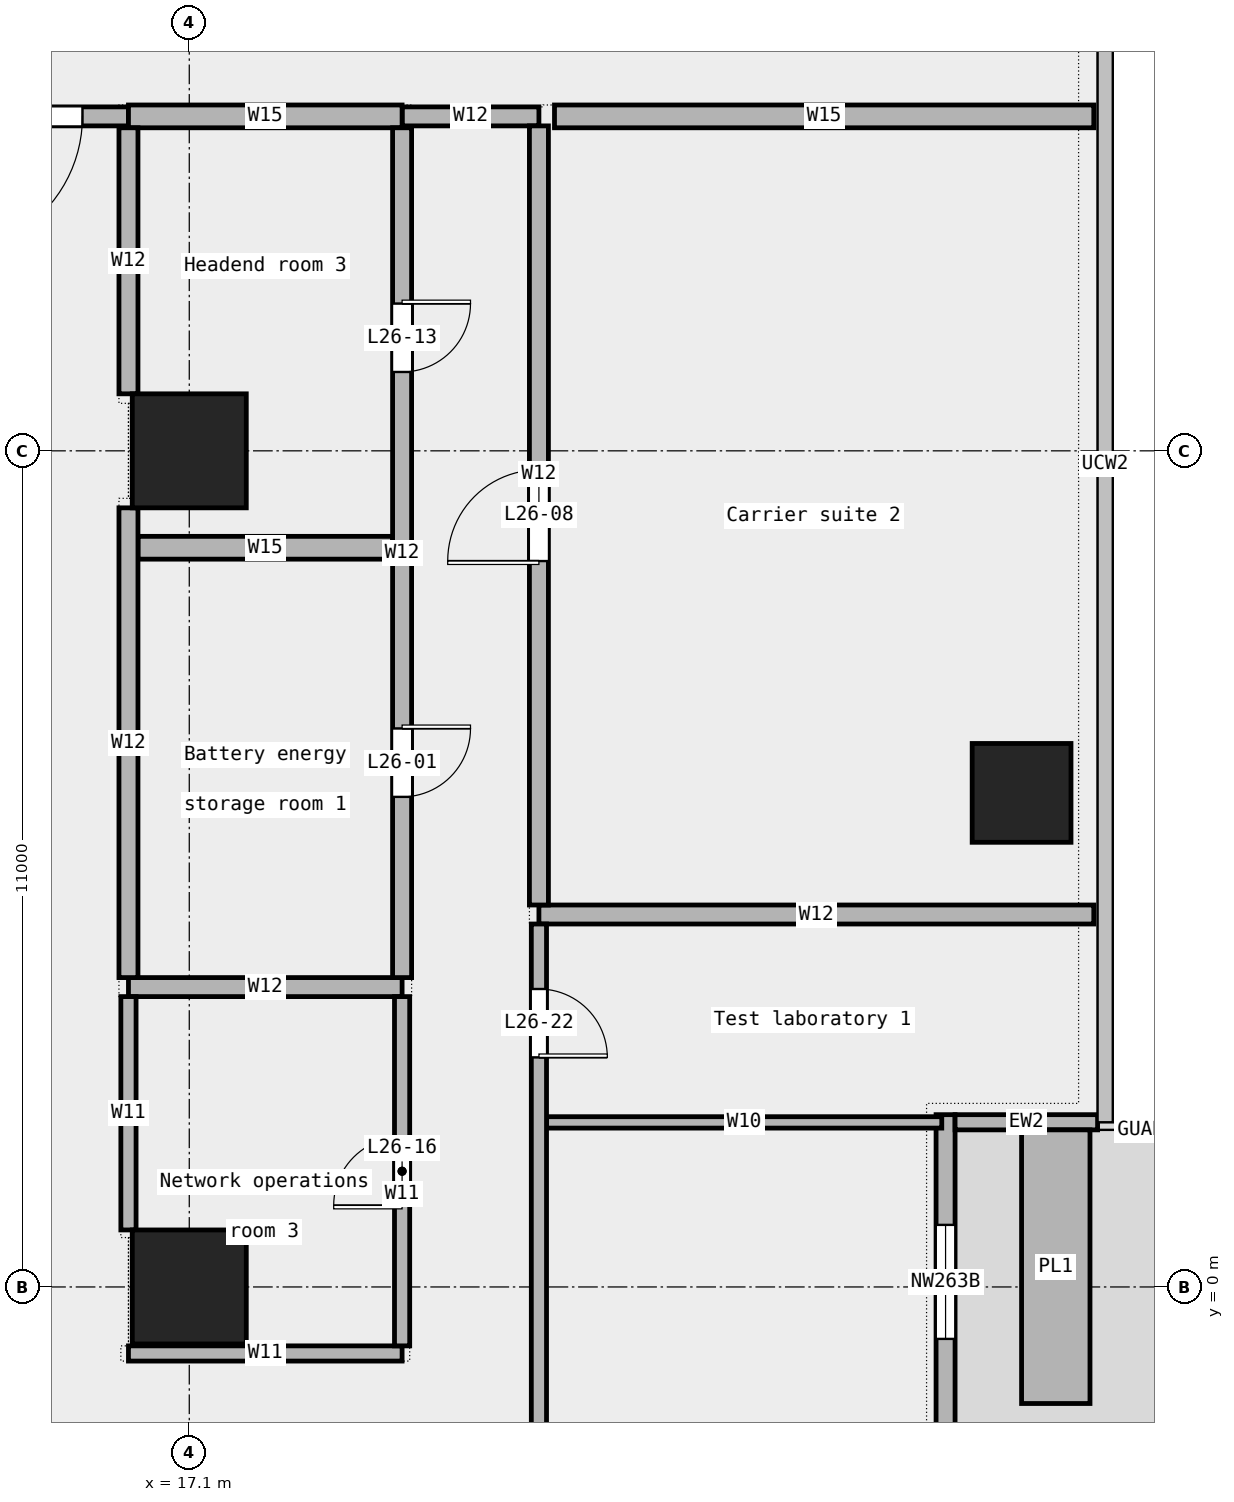
"""IFC4 building model, lengths in metres.
Left out: names, types, materials, properties, quantities, classifications, styles, units other than length and angle.
Written with IfcOpenShell. Run it as: python <this file> out.ifc"""

import sys

from ifc_helpers import new_model, si_unit, direction, frame, frame_2d, origin, origin_2d, place, context, subcontext, project, spatial, rectangle, extrude, element, fill, save


model = new_model("IFC4")
c1 = context("Model", 3, precision=1e-05, world=origin(), true_north=direction((0.0, 1.0)))
c2 = subcontext(c1, "Body", "Model", "MODEL_VIEW")
j1 = project(units=[si_unit("LENGTHUNIT", "METRE"), si_unit("PLANEANGLEUNIT", "RADIAN")], contexts=[c1])
p1 = place(None, origin())
s1 = spatial("IfcSite", under=j1, at=p1, CompositionType="ELEMENT")
p2 = place(p1, origin())
s2 = spatial("IfcBuilding", under=s1, at=p2, CompositionType="ELEMENT")
p3 = place(p2, frame((0.0, 0.0, 130.6)))
s3 = spatial("IfcBuildingStorey", under=s2, at=p3, CompositionType="ELEMENT", Elevation=130.6)
p4 = place(p3, frame((28.05, 6.5, 0.0), z_axis=(0.0, 0.0, 1.0), x_axis=(1.0, 0.0, 0.0)))
e1 = element("IfcColumn", 1, at=p4, inside=s3, PredefinedType="COLUMN", context=c2, shape_type="SweptSolid", body=[
    extrude(rectangle(XDim=1.3, YDim=1.3, at=origin_2d()), origin(), (0.0, 0.0, 1.0), 4.05),
])
for number, where, z_axis, x_axis in (
    (2, (17.1, 0.0, 0.0), (0.0, 0.0, 1.0), (1.0, 0.0, 0.0)),
    (3, (17.1, 11.0, 0.0), (0.0, 0.0, 1.0), (1.0, 0.0, 0.0)),
):
    element("IfcColumn", number, at=place(p3, frame(where, z_axis=z_axis, x_axis=x_axis)), inside=s3, PredefinedType="COLUMN", context=c2, shape_type="SweptSolid", body=[
        extrude(rectangle(XDim=1.5, YDim=1.5, at=origin_2d()), origin(), (0.0, 0.0, 1.0), 4.05),
    ])
p5 = place(p3, frame((27.05, -10.933, 0.0), z_axis=(0.0, 0.0, 1.0), x_axis=(0.0, 1.0, 0.0)))
e4 = element("IfcWall", 4, at=p5, inside=s3, PredefinedType="STANDARD", context=c2, shape_type="SweptSolid", body=[
    extrude(rectangle(XDim=13.2, YDim=0.25, at=frame_2d((6.6, 0.0))), origin(), (0.0, 0.0, 1.0), 4.05),
])
p6 = place(p5, frame((1.5, 0.0, 0.45)))
e5 = element("IfcOpeningElement", 5, at=p6, cuts=e4, PredefinedType="OPENING", context=c2, shape_type="SweptSolid", body=[
    extrude(rectangle(XDim=1.5, YDim=3.0, at=frame_2d((0.75, 1.5))), frame((0.0, 0.137, 0.0), z_axis=(0.0, -1.0, 0.0), x_axis=(1.0, 0.0, 0.0)), (0.0, 0.0, 1.0), 0.274),
])
p7 = place(p5, frame((5.75, 0.0, 0.0)))
e6 = element("IfcOpeningElement", 6, at=p7, cuts=e4, PredefinedType="OPENING", context=c2, shape_type="SweptSolid", body=[
    extrude(rectangle(XDim=1.8, YDim=2.4, at=frame_2d((0.9, 1.2))), frame((0.0, 0.137, 0.0), z_axis=(0.0, -1.0, 0.0), x_axis=(1.0, 0.0, 0.0)), (0.0, 0.0, 1.0), 0.274),
])
p8 = place(p5, frame((10.25, 0.0, 0.45)))
e7 = element("IfcOpeningElement", 7, at=p8, cuts=e4, PredefinedType="OPENING", context=c2, shape_type="SweptSolid", body=[
    extrude(rectangle(XDim=1.5, YDim=3.0, at=frame_2d((0.75, 1.5))), frame((0.0, 0.137, 0.0), z_axis=(0.0, -1.0, 0.0), x_axis=(1.0, 0.0, 0.0)), (0.0, 0.0, 1.0), 0.274),
])
p9 = place(p3, frame((29.05, 2.167, 0.0), z_axis=(0.0, 0.0, 1.0), x_axis=(-1.0, 0.0, 0.0)))
e8 = element("IfcWall", 8, at=p9, inside=s3, PredefinedType="STANDARD", context=c2, shape_type="SweptSolid", body=[
    extrude(rectangle(XDim=1.875, YDim=0.2, at=frame_2d((0.938, 0.0))), origin(), (0.0, 0.0, 1.0), 4.05),
])
p10 = place(p3, frame((28.5, -1.533, 0.0), z_axis=(0.0, 0.0, 1.0), x_axis=(0.0, 1.0, 0.0)))
e9 = element("IfcWall", 9, at=p10, inside=s3, PredefinedType="STANDARD", context=c2, shape_type="SweptSolid", body=[
    extrude(rectangle(XDim=3.6, YDim=0.9, at=frame_2d((1.8, 0.0))), origin(), (0.0, 0.0, 1.0), 0.7),
])
p11 = place(p3, frame((16.3, -0.875, 0.0), z_axis=(0.0, 0.0, 1.0), x_axis=(1.0, 0.0, 0.0)))
e10 = element("IfcWall", 10, at=p11, inside=s3, PredefinedType="PARTITIONING", context=c2, shape_type="SweptSolid", body=[
    extrude(rectangle(XDim=3.6, YDim=0.2, at=frame_2d((1.8, 0.0))), origin(), (0.0, 0.0, 1.0), 4.05),
])
p12 = place(p3, frame((21.8, 2.165, 0.0), z_axis=(0.0, 0.0, 1.0), x_axis=(1.0, 0.0, 0.0)))
e11 = element("IfcWall", 11, at=p12, inside=s3, PredefinedType="PARTITIONING", context=c2, shape_type="SweptSolid", body=[
    extrude(rectangle(XDim=5.2, YDim=0.15, at=frame_2d((2.6, 0.0))), origin(), (0.0, 0.0, 1.0), 4.05),
])
p13 = place(p3, frame((16.3, 3.945, 0.0), z_axis=(0.0, 0.0, 1.0), x_axis=(1.0, 0.0, 0.0)))
e12 = element("IfcWall", 12, at=p13, inside=s3, PredefinedType="PARTITIONING", context=c2, shape_type="SweptSolid", body=[
    extrude(rectangle(XDim=3.6, YDim=0.25, at=frame_2d((1.8, 0.0))), origin(), (0.0, 0.0, 1.0), 4.05),
])
p14 = place(p3, frame((21.7, 4.9, 0.0), z_axis=(0.0, 0.0, 1.0), x_axis=(1.0, 0.0, 0.0)))
e13 = element("IfcWall", 13, at=p14, inside=s3, PredefinedType="PARTITIONING", context=c2, shape_type="SweptSolid", body=[
    extrude(rectangle(XDim=7.3, YDim=0.25, at=frame_2d((3.65, 0.0))), origin(), (0.0, 0.0, 1.0), 4.05),
])
p15 = place(p3, frame((16.425, 9.725, 0.0), z_axis=(0.0, 0.0, 1.0), x_axis=(1.0, 0.0, 0.0)))
e14 = element("IfcWall", 14, at=p15, inside=s3, PredefinedType="PARTITIONING", context=c2, shape_type="SweptSolid", body=[
    extrude(rectangle(XDim=3.35, YDim=0.3, at=frame_2d((1.675, 0.0))), origin(), (0.0, 0.0, 1.0), 4.05),
])
p16 = place(p3, frame((13.29, 15.4, 0.0), z_axis=(0.0, 0.0, 1.0), x_axis=(1.0, 0.0, 0.0)))
e15 = element("IfcWall", 15, at=p16, inside=s3, PredefinedType="PARTITIONING", context=c2, shape_type="SweptSolid", body=[
    extrude(rectangle(XDim=3.01, YDim=0.25, at=frame_2d((1.505, 0.0))), origin(), (0.0, 0.0, 1.0), 4.05),
])
p17 = place(p16, frame((0.605, 0.0, 0.0)))
e16 = element("IfcOpeningElement", 16, at=p17, cuts=e15, PredefinedType="OPENING", context=c2, shape_type="SweptSolid", body=[
    extrude(rectangle(XDim=1.8, YDim=2.1, at=frame_2d((0.9, 1.05))), frame((0.0, 0.137, 0.0), z_axis=(0.0, -1.0, 0.0), x_axis=(1.0, 0.0, 0.0)), (0.0, 0.0, 1.0), 0.274),
])
p18 = place(p3, frame((19.9, 15.4, 0.0), z_axis=(0.0, 0.0, 1.0), x_axis=(1.0, 0.0, 0.0)))
e17 = element("IfcWall", 17, at=p18, inside=s3, PredefinedType="PARTITIONING", context=c2, shape_type="SweptSolid", body=[
    extrude(rectangle(XDim=1.8, YDim=0.25, at=frame_2d((0.9, 0.0))), origin(), (0.0, 0.0, 1.0), 4.05),
])
p19 = place(p3, frame((16.3, 15.4, 0.0), z_axis=(0.0, 0.0, 1.0), x_axis=(1.0, 0.0, 0.0)))
e18 = element("IfcWall", 18, at=p19, inside=s3, PredefinedType="PARTITIONING", context=c2, shape_type="SweptSolid", body=[
    extrude(rectangle(XDim=3.6, YDim=0.3, at=frame_2d((1.8, 0.0))), origin(), (0.0, 0.0, 1.0), 4.05),
])
p20 = place(p3, frame((21.905, 15.4, 0.0), z_axis=(0.0, 0.0, 1.0), x_axis=(1.0, 0.0, 0.0)))
e19 = element("IfcWall", 19, at=p20, inside=s3, PredefinedType="PARTITIONING", context=c2, shape_type="SweptSolid", body=[
    extrude(rectangle(XDim=7.095, YDim=0.3, at=frame_2d((3.547, 0.0))), origin(), (0.0, 0.0, 1.0), 4.05),
])
p21 = place(p3, frame((16.3, 0.75, 0.0), z_axis=(0.0, 0.0, 1.0), x_axis=(0.0, 1.0, 0.0)))
e20 = element("IfcWall", 20, at=p21, inside=s3, PredefinedType="PARTITIONING", context=c2, shape_type="SweptSolid", body=[
    extrude(rectangle(XDim=3.07, YDim=0.2, at=frame_2d((1.535, 0.0))), origin(), (0.0, 0.0, 1.0), 4.05),
])
p22 = place(p3, frame((16.3, 4.07, 0.0), z_axis=(0.0, 0.0, 1.0), x_axis=(0.0, 1.0, 0.0)))
e21 = element("IfcWall", 21, at=p22, inside=s3, PredefinedType="PARTITIONING", context=c2, shape_type="SweptSolid", body=[
    extrude(rectangle(XDim=6.18, YDim=0.25, at=frame_2d((3.09, 0.0))), origin(), (0.0, 0.0, 1.0), 4.05),
])
p23 = place(p3, frame((16.3, 11.75, 0.0), z_axis=(0.0, 0.0, 1.0), x_axis=(0.0, 1.0, 0.0)))
e22 = element("IfcWall", 22, at=p23, inside=s3, PredefinedType="PARTITIONING", context=c2, shape_type="SweptSolid", body=[
    extrude(rectangle(XDim=3.5, YDim=0.25, at=frame_2d((1.75, 0.0))), origin(), (0.0, 0.0, 1.0), 4.05),
])
p24 = place(p3, frame((19.9, -0.775, 0.0), z_axis=(0.0, 0.0, 1.0), x_axis=(0.0, 1.0, 0.0)))
e23 = element("IfcWall", 23, at=p24, inside=s3, PredefinedType="PARTITIONING", context=c2, shape_type="SweptSolid", body=[
    extrude(rectangle(XDim=4.595, YDim=0.2, at=frame_2d((2.297, 0.0))), origin(), (0.0, 0.0, 1.0), 4.05),
])
p25 = place(p24, frame((1.847, 0.0, 0.0)))
e24 = element("IfcOpeningElement", 24, at=p25, cuts=e23, PredefinedType="OPENING", context=c2, shape_type="SweptSolid", body=[
    extrude(rectangle(XDim=0.9, YDim=2.1, at=frame_2d((0.45, 1.05))), frame((0.0, 0.112, 0.0), z_axis=(0.0, -1.0, 0.0), x_axis=(1.0, 0.0, 0.0)), (0.0, 0.0, 1.0), 0.224),
])
p26 = place(p3, frame((19.9, 4.07, 0.0), z_axis=(0.0, 0.0, 1.0), x_axis=(0.0, 1.0, 0.0)))
e25 = element("IfcWall", 25, at=p26, inside=s3, PredefinedType="PARTITIONING", context=c2, shape_type="SweptSolid", body=[
    extrude(rectangle(XDim=11.18, YDim=0.25, at=frame_2d((5.59, 0.0))), origin(), (0.0, 0.0, 1.0), 4.05),
])
p27 = place(p26, frame((2.377, 0.0, 0.0)))
e26 = element("IfcOpeningElement", 26, at=p27, cuts=e25, PredefinedType="OPENING", context=c2, shape_type="SweptSolid", body=[
    extrude(rectangle(XDim=0.9, YDim=2.1, at=frame_2d((0.45, 1.05))), frame((0.0, 0.137, 0.0), z_axis=(0.0, -1.0, 0.0), x_axis=(1.0, 0.0, 0.0)), (0.0, 0.0, 1.0), 0.274),
])
p28 = place(p26, frame((7.968, 0.0, 0.0)))
e27 = element("IfcOpeningElement", 27, at=p28, cuts=e25, PredefinedType="OPENING", context=c2, shape_type="SweptSolid", body=[
    extrude(rectangle(XDim=0.9, YDim=2.1, at=frame_2d((0.45, 1.05))), frame((0.0, 0.137, 0.0), z_axis=(0.0, -1.0, 0.0), x_axis=(1.0, 0.0, 0.0)), (0.0, 0.0, 1.0), 0.274),
])
p29 = place(p3, frame((21.7, -9.0, 0.0), z_axis=(0.0, 0.0, 1.0), x_axis=(0.0, 1.0, 0.0)))
e28 = element("IfcWall", 28, at=p29, inside=s3, PredefinedType="PARTITIONING", context=c2, shape_type="SweptSolid", body=[
    extrude(rectangle(XDim=13.775, YDim=0.2, at=frame_2d((6.887, 0.0))), origin(), (0.0, 0.0, 1.0), 4.05),
])
p30 = place(p29, frame((4.833, 0.0, 0.0)))
e29 = element("IfcOpeningElement", 29, at=p30, cuts=e28, PredefinedType="OPENING", context=c2, shape_type="SweptSolid", body=[
    extrude(rectangle(XDim=1.5, YDim=2.1, at=frame_2d((0.75, 1.05))), frame((0.0, 0.112, 0.0), z_axis=(0.0, -1.0, 0.0), x_axis=(1.0, 0.0, 0.0)), (0.0, 0.0, 1.0), 0.224),
])
p31 = place(p29, frame((12.02, 0.0, 0.0)))
e30 = element("IfcOpeningElement", 30, at=p31, cuts=e28, PredefinedType="OPENING", context=c2, shape_type="SweptSolid", body=[
    extrude(rectangle(XDim=0.9, YDim=2.1, at=frame_2d((0.45, 1.05))), frame((0.0, 0.112, 0.0), z_axis=(0.0, -1.0, 0.0), x_axis=(1.0, 0.0, 0.0)), (0.0, 0.0, 1.0), 0.224),
])
p32 = place(p3, frame((21.7, 5.025, 0.0), z_axis=(0.0, 0.0, 1.0), x_axis=(0.0, 1.0, 0.0)))
e31 = element("IfcWall", 31, at=p32, inside=s3, PredefinedType="PARTITIONING", context=c2, shape_type="SweptSolid", body=[
    extrude(rectangle(XDim=10.25, YDim=0.25, at=frame_2d((5.125, 0.0))), origin(), (0.0, 0.0, 1.0), 4.05),
])
p33 = place(p32, frame((4.525, 0.0, 0.0)))
e32 = element("IfcOpeningElement", 32, at=p33, cuts=e31, PredefinedType="OPENING", context=c2, shape_type="SweptSolid", body=[
    extrude(rectangle(XDim=1.2, YDim=2.1, at=frame_2d((0.6, 1.05))), frame((0.0, 0.137, 0.0), z_axis=(0.0, -1.0, 0.0), x_axis=(1.0, 0.0, 0.0)), (0.0, 0.0, 1.0), 0.274),
])
p34 = place(p8, origin())
e33 = element("IfcWindow", 33, at=p34, inside=s3, PartitioningType="SINGLE_PANEL", PredefinedType="WINDOW", context=c2, shape_type="SweptSolid", body=[
    extrude(rectangle(XDim=1.5, YDim=3.0, at=frame_2d((0.75, 1.5))), frame((0.0, 0.03, 0.0), z_axis=(0.0, -1.0, 0.0), x_axis=(1.0, 0.0, 0.0)), (0.0, 0.0, 1.0), 0.06),
])
fill(e7, e33)
p35 = place(p27, origin())
e34 = element("IfcDoor", 34, at=p35, inside=s3, OperationType="SINGLE_SWING_LEFT", PredefinedType="DOOR", context=c2, shape_type="SweptSolid", body=[
    extrude(rectangle(XDim=0.9, YDim=2.1, at=frame_2d((0.45, 1.05))), frame((0.0, 0.025, 0.0), z_axis=(0.0, -1.0, 0.0), x_axis=(1.0, 0.0, 0.0)), (0.0, 0.0, 1.0), 0.05),
])
fill(e26, e34)
p36 = place(p33, origin())
e35 = element("IfcDoor", 35, at=p36, inside=s3, OperationType="SINGLE_SWING_LEFT", PredefinedType="DOOR", context=c2, shape_type="SweptSolid", body=[
    extrude(rectangle(XDim=1.2, YDim=2.1, at=frame_2d((0.6, 1.05))), frame((0.0, 0.025, 0.0), z_axis=(0.0, -1.0, 0.0), x_axis=(1.0, 0.0, 0.0)), (0.0, 0.0, 1.0), 0.05),
])
fill(e32, e35)
p37 = place(p28, origin())
e36 = element("IfcDoor", 36, at=p37, inside=s3, OperationType="SINGLE_SWING_LEFT", PredefinedType="DOOR", context=c2, shape_type="SweptSolid", body=[
    extrude(rectangle(XDim=0.9, YDim=2.1, at=frame_2d((0.45, 1.05))), frame((0.0, 0.025, 0.0), z_axis=(0.0, -1.0, 0.0), x_axis=(1.0, 0.0, 0.0)), (0.0, 0.0, 1.0), 0.05),
])
fill(e27, e36)
p38 = place(p25, origin())
e37 = element("IfcDoor", 37, at=p38, inside=s3, OperationType="SINGLE_SWING_LEFT", PredefinedType="DOOR", context=c2, shape_type="SweptSolid", body=[
    extrude(rectangle(XDim=0.9, YDim=2.1, at=frame_2d((0.45, 1.05))), frame((0.0, 0.025, 0.0), z_axis=(0.0, -1.0, 0.0), x_axis=(1.0, 0.0, 0.0)), (0.0, 0.0, 1.0), 0.05),
])
fill(e24, e37)
p39 = place(p17, origin())
e38 = element("IfcDoor", 38, at=p39, inside=s3, OperationType="DOUBLE_DOOR_SINGLE_SWING", PredefinedType="DOOR", context=c2, shape_type="SweptSolid", body=[
    extrude(rectangle(XDim=1.8, YDim=2.1, at=frame_2d((0.9, 1.05))), frame((0.0, 0.025, 0.0), z_axis=(0.0, -1.0, 0.0), x_axis=(1.0, 0.0, 0.0)), (0.0, 0.0, 1.0), 0.05),
])
fill(e16, e38)
p40 = place(p31, origin())
e39 = element("IfcDoor", 39, at=p40, inside=s3, OperationType="SINGLE_SWING_RIGHT", PredefinedType="DOOR", context=c2, shape_type="SweptSolid", body=[
    extrude(rectangle(XDim=0.9, YDim=2.1, at=frame_2d((0.45, 1.05))), frame((0.0, 0.025, 0.0), z_axis=(0.0, -1.0, 0.0), x_axis=(1.0, 0.0, 0.0)), (0.0, 0.0, 1.0), 0.05),
])
fill(e30, e39)
save(model, sys.argv[1])
